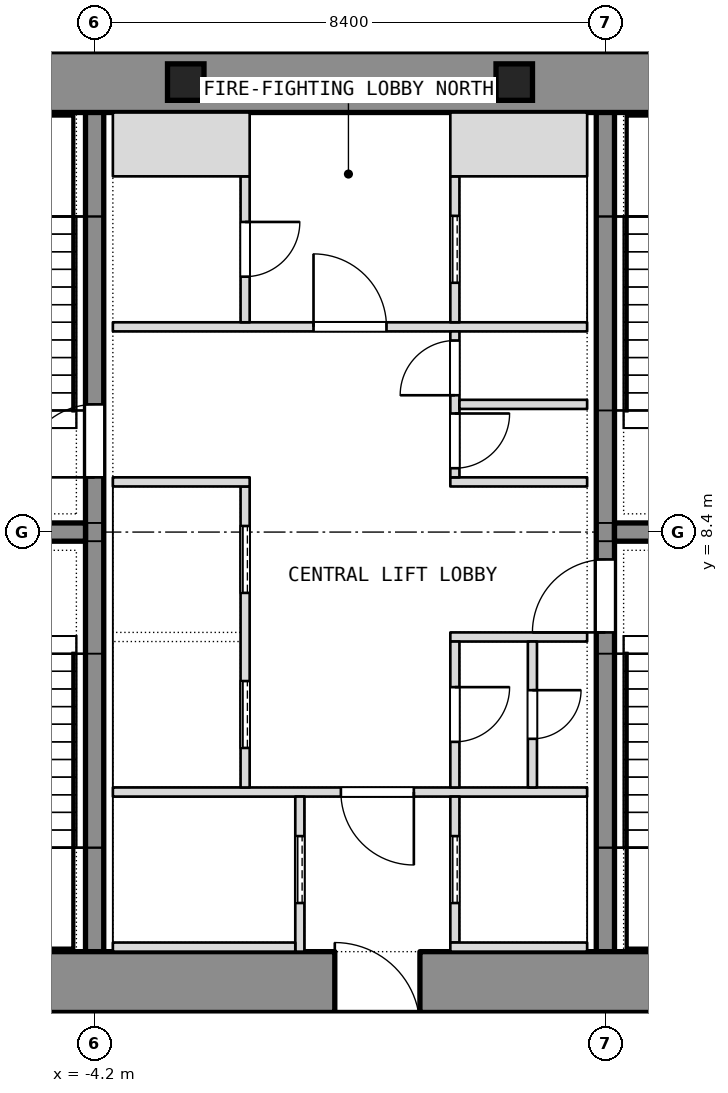
"""IFC4 building model, lengths in metres.
Left out: names, types, materials, properties, quantities, classifications, styles, units other than length and angle.
Written with IfcOpenShell. Run it as: python <this file> out.ifc"""

import sys

from ifc_helpers import new_model, si_unit, direction, frame, frame_2d, origin, origin_2d, place, context, subcontext, project, spatial, rectangle, extrude, element, fill, save


model = new_model("IFC4")
c1 = context("Model", 3, precision=1e-05, world=origin(), true_north=direction((0.0, 1.0)))
c2 = subcontext(c1, "Body", "Model", "MODEL_VIEW")
j1 = project(units=[si_unit("LENGTHUNIT", "METRE"), si_unit("PLANEANGLEUNIT", "RADIAN")], contexts=[c1])
p1 = place(None, origin())
s1 = spatial("IfcSite", under=j1, at=p1, CompositionType="ELEMENT")
p2 = place(p1, origin())
s2 = spatial("IfcBuilding", under=s1, at=p2, CompositionType="ELEMENT")
p3 = place(p2, frame((0.0, 0.0, 281.3)))
s3 = spatial("IfcBuildingStorey", under=s2, at=p3, CompositionType="ELEMENT", Elevation=281.3)
p4 = place(p3, frame((-4.2, 0.5, 0.0), z_axis=(0.0, 0.0, 1.0), x_axis=(0.0, 1.0, 0.0)))
e1 = element("IfcWall", 1, at=p4, inside=s3, PredefinedType="SHEAR", context=c2, shape_type="SweptSolid", body=[
    extrude(rectangle(XDim=15.8, YDim=0.3, at=frame_2d((7.9, 0.0))), origin(), (0.0, 0.0, 1.0), 7.2),
])
p5 = place(p4, frame((8.8, 0.0, 0.0)))
e2 = element("IfcOpeningElement", 2, at=p5, cuts=e1, PredefinedType="OPENING", context=c2, shape_type="SweptSolid", body=[
    extrude(rectangle(XDim=1.2, YDim=2.1, at=frame_2d((0.6, 1.05))), frame((0.0, 0.15, 0.0), z_axis=(0.0, -1.0, 0.0), x_axis=(1.0, 0.0, 0.0)), (0.0, 0.0, 1.0), 0.3),
])
p6 = place(p3, frame((4.2, 0.5, 0.0), z_axis=(0.0, 0.0, 1.0), x_axis=(0.0, 1.0, 0.0)))
e3 = element("IfcWall", 3, at=p6, inside=s3, PredefinedType="SHEAR", context=c2, shape_type="SweptSolid", body=[
    extrude(rectangle(XDim=15.8, YDim=0.3, at=frame_2d((7.9, 0.0))), origin(), (0.0, 0.0, 1.0), 7.2),
])
p7 = place(p6, frame((6.25, 0.0, 0.0)))
e4 = element("IfcOpeningElement", 4, at=p7, cuts=e3, PredefinedType="OPENING", context=c2, shape_type="SweptSolid", body=[
    extrude(rectangle(XDim=1.2, YDim=2.1, at=frame_2d((0.6, 1.05))), frame((0.0, 0.15, 0.0), z_axis=(0.0, -1.0, 0.0), x_axis=(1.0, 0.0, 0.0)), (0.0, 0.0, 1.0), 0.3),
])
for number, where, z_axis, x_axis in (
    (5, (-11.1, 8.4, 0.0), (0.0, 0.0, 1.0), (1.0, 0.0, 0.0)),
    (6, (4.35, 8.4, 0.0), (0.0, 0.0, 1.0), (1.0, 0.0, 0.0)),
):
    element("IfcWall", number, at=place(p3, frame(where, z_axis=z_axis, x_axis=x_axis)), inside=s3, PredefinedType="SHEAR", context=c2, shape_type="SweptSolid", body=[
        extrude(rectangle(XDim=6.75, YDim=0.3, at=frame_2d((3.375, 0.0))), origin(), (0.0, 0.0, 1.0), 7.2),
    ])
for number, where, z_axis, x_axis in (
    (7, (-2.701, 15.8, 0.0), (0.0, 0.0, 1.0), (1.0, 0.0, 0.0)),
    (8, (2.701, 15.8, 0.0), (0.0, 0.0, 1.0), (1.0, 0.0, 0.0)),
):
    element("IfcColumn", number, at=place(p3, frame(where, z_axis=z_axis, x_axis=x_axis)), inside=s3, PredefinedType="COLUMN", context=c2, shape_type="SweptSolid", body=[
        extrude(rectangle(XDim=0.6, YDim=0.6, at=origin_2d()), origin(), (0.0, 0.0, 1.0), 7.2),
    ])
p8 = place(p3, frame((-11.1, 1.0, 0.0), z_axis=(0.0, 0.0, 1.0), x_axis=(1.0, 0.0, 0.0)))
e9 = element("IfcWall", 9, at=p8, inside=s3, PredefinedType="PARTITIONING", context=c2, shape_type="SweptSolid", body=[
    extrude(rectangle(XDim=10.85, YDim=1.0, at=frame_2d((5.425, 0.0))), origin(), (0.0, 0.0, 1.0), 6.94),
])
p9 = place(p3, frame((1.15, 1.0, 0.0), z_axis=(0.0, 0.0, 1.0), x_axis=(1.0, 0.0, 0.0)))
e10 = element("IfcWall", 10, at=p9, inside=s3, PredefinedType="PARTITIONING", context=c2, shape_type="SweptSolid", body=[
    extrude(rectangle(XDim=9.95, YDim=1.0, at=frame_2d((4.975, 0.0))), origin(), (0.0, 0.0, 1.0), 6.94),
])
p10 = place(p3, frame((-11.1, 15.8, 0.0), z_axis=(0.0, 0.0, 1.0), x_axis=(1.0, 0.0, 0.0)))
e11 = element("IfcWall", 11, at=p10, inside=s3, PredefinedType="PARTITIONING", context=c2, shape_type="SweptSolid", body=[
    extrude(rectangle(XDim=22.2, YDim=1.0, at=frame_2d((11.1, 0.0))), origin(), (0.0, 0.0, 1.0), 6.94),
])
p11 = place(p3, frame((-3.9, 4.125, 0.0), z_axis=(0.0, 0.0, 1.0), x_axis=(1.0, 0.0, 0.0)))
e12 = element("IfcWall", 12, at=p11, inside=s3, PredefinedType="PARTITIONING", context=c2, shape_type="SweptSolid", body=[
    extrude(rectangle(XDim=7.8, YDim=0.15, at=frame_2d((3.9, 0.0))), origin(), (0.0, 0.0, 1.0), 6.94),
])
p12 = place(p11, frame((3.75, 0.0, 0.0)))
e13 = element("IfcOpeningElement", 13, at=p12, cuts=e12, PredefinedType="OPENING", context=c2, shape_type="SweptSolid", body=[
    extrude(rectangle(XDim=1.2, YDim=2.1, at=frame_2d((0.6, 1.05))), frame((0.0, 0.075, 0.0), z_axis=(0.0, -1.0, 0.0), x_axis=(1.0, 0.0, 0.0)), (0.0, 0.0, 1.0), 0.15),
])
p13 = place(p3, frame((-3.9, 11.775, 0.0), z_axis=(0.0, 0.0, 1.0), x_axis=(1.0, 0.0, 0.0)))
e14 = element("IfcWall", 14, at=p13, inside=s3, PredefinedType="PARTITIONING", context=c2, shape_type="SweptSolid", body=[
    extrude(rectangle(XDim=7.8, YDim=0.15, at=frame_2d((3.9, 0.0))), origin(), (0.0, 0.0, 1.0), 6.94),
])
p14 = place(p13, frame((3.3, 0.0, 0.0)))
e15 = element("IfcOpeningElement", 15, at=p14, cuts=e14, PredefinedType="OPENING", context=c2, shape_type="SweptSolid", body=[
    extrude(rectangle(XDim=1.2, YDim=2.1, at=frame_2d((0.6, 1.05))), frame((0.0, 0.075, 0.0), z_axis=(0.0, -1.0, 0.0), x_axis=(1.0, 0.0, 0.0)), (0.0, 0.0, 1.0), 0.15),
])
p15 = place(p3, frame((-0.825, 1.5, 0.0), z_axis=(0.0, 0.0, 1.0), x_axis=(0.0, 1.0, 0.0)))
e16 = element("IfcWall", 16, at=p15, inside=s3, PredefinedType="SHEAR", context=c2, shape_type="SweptSolid", body=[
    extrude(rectangle(XDim=2.55, YDim=0.15, at=frame_2d((1.275, 0.0))), origin(), (0.0, 0.0, 1.0), 7.2),
])
p16 = place(p15, frame((0.8, 0.0, 0.0)))
e17 = element("IfcOpeningElement", 17, at=p16, cuts=e16, PredefinedType="OPENING", context=c2, shape_type="SweptSolid", body=[
    extrude(rectangle(XDim=1.1, YDim=2.1, at=frame_2d((0.55, 1.05))), frame((0.0, 0.075, 0.0), z_axis=(0.0, -1.0, 0.0), x_axis=(1.0, 0.0, 0.0)), (0.0, 0.0, 1.0), 0.15),
])
p17 = place(p3, frame((-3.9, 1.575, 0.0), z_axis=(0.0, 0.0, 1.0), x_axis=(1.0, 0.0, 0.0)))
e18 = element("IfcWall", 18, at=p17, inside=s3, PredefinedType="SHEAR", context=c2, shape_type="SweptSolid", body=[
    extrude(rectangle(XDim=3.0, YDim=0.15, at=frame_2d((1.5, 0.0))), origin(), (0.0, 0.0, 1.0), 7.2),
])
p18 = place(p3, frame((-1.725, 4.2, 0.0), z_axis=(0.0, 0.0, 1.0), x_axis=(0.0, 1.0, 0.0)))
e19 = element("IfcWall", 19, at=p18, inside=s3, PredefinedType="SHEAR", context=c2, shape_type="SweptSolid", body=[
    extrude(rectangle(XDim=4.95, YDim=0.15, at=frame_2d((2.475, 0.0))), origin(), (0.0, 0.0, 1.0), 7.2),
])
p19 = place(p18, frame((0.65, 0.0, 0.0)))
e20 = element("IfcOpeningElement", 20, at=p19, cuts=e19, PredefinedType="OPENING", context=c2, shape_type="SweptSolid", body=[
    extrude(rectangle(XDim=1.1, YDim=2.1, at=frame_2d((0.55, 1.05))), frame((0.0, 0.075, 0.0), z_axis=(0.0, -1.0, 0.0), x_axis=(1.0, 0.0, 0.0)), (0.0, 0.0, 1.0), 0.15),
])
p20 = place(p18, frame((3.2, 0.0, 0.0)))
e21 = element("IfcOpeningElement", 21, at=p20, cuts=e19, PredefinedType="OPENING", context=c2, shape_type="SweptSolid", body=[
    extrude(rectangle(XDim=1.1, YDim=2.1, at=frame_2d((0.55, 1.05))), frame((0.0, 0.075, 0.0), z_axis=(0.0, -1.0, 0.0), x_axis=(1.0, 0.0, 0.0)), (0.0, 0.0, 1.0), 0.15),
])
p21 = place(p3, frame((-3.9, 9.225, 0.0), z_axis=(0.0, 0.0, 1.0), x_axis=(1.0, 0.0, 0.0)))
e22 = element("IfcWall", 22, at=p21, inside=s3, PredefinedType="SHEAR", context=c2, shape_type="SweptSolid", body=[
    extrude(rectangle(XDim=2.25, YDim=0.15, at=frame_2d((1.125, 0.0))), origin(), (0.0, 0.0, 1.0), 7.2),
])
p22 = place(p3, frame((-1.725, 11.85, 0.0), z_axis=(0.0, 0.0, 1.0), x_axis=(0.0, 1.0, 0.0)))
e23 = element("IfcWall", 23, at=p22, inside=s3, PredefinedType="PARTITIONING", context=c2, shape_type="SweptSolid", body=[
    extrude(rectangle(XDim=2.4, YDim=0.15, at=frame_2d((1.2, 0.0))), origin(), (0.0, 0.0, 1.0), 6.94),
])
p23 = place(p22, frame((0.75, 0.0, 0.0)))
e24 = element("IfcOpeningElement", 24, at=p23, cuts=e23, PredefinedType="OPENING", context=c2, shape_type="SweptSolid", body=[
    extrude(rectangle(XDim=0.9, YDim=2.1, at=frame_2d((0.45, 1.05))), frame((0.0, 0.075, 0.0), z_axis=(0.0, -1.0, 0.0), x_axis=(1.0, 0.0, 0.0)), (0.0, 0.0, 1.0), 0.15),
])
p24 = place(p3, frame((-3.9, 14.775, 0.0), z_axis=(0.0, 0.0, 1.0), x_axis=(1.0, 0.0, 0.0)))
e25 = element("IfcWall", 25, at=p24, inside=s3, PredefinedType="PARTITIONING", context=c2, shape_type="SweptSolid", body=[
    extrude(rectangle(XDim=2.25, YDim=1.05, at=frame_2d((1.125, 0.0))), origin(), (0.0, 0.0, 1.0), 6.94),
])
p25 = place(p3, frame((1.725, 1.65, 0.0), z_axis=(0.0, 0.0, 1.0), x_axis=(0.0, 1.0, 0.0)))
e26 = element("IfcWall", 26, at=p25, inside=s3, PredefinedType="SHEAR", context=c2, shape_type="SweptSolid", body=[
    extrude(rectangle(XDim=2.4, YDim=0.15, at=frame_2d((1.2, 0.0))), origin(), (0.0, 0.0, 1.0), 7.2),
])
p26 = place(p25, frame((0.65, 0.0, 0.0)))
e27 = element("IfcOpeningElement", 27, at=p26, cuts=e26, PredefinedType="OPENING", context=c2, shape_type="SweptSolid", body=[
    extrude(rectangle(XDim=1.1, YDim=2.1, at=frame_2d((0.55, 1.05))), frame((0.0, 0.075, 0.0), z_axis=(0.0, -1.0, 0.0), x_axis=(1.0, 0.0, 0.0)), (0.0, 0.0, 1.0), 0.15),
])
p27 = place(p3, frame((1.65, 1.575, 0.0), z_axis=(0.0, 0.0, 1.0), x_axis=(1.0, 0.0, 0.0)))
e28 = element("IfcWall", 28, at=p27, inside=s3, PredefinedType="SHEAR", context=c2, shape_type="SweptSolid", body=[
    extrude(rectangle(XDim=2.25, YDim=0.15, at=frame_2d((1.125, 0.0))), origin(), (0.0, 0.0, 1.0), 7.2),
])
p28 = place(p3, frame((1.725, 11.85, 0.0), z_axis=(0.0, 0.0, 1.0), x_axis=(0.0, 1.0, 0.0)))
e29 = element("IfcWall", 29, at=p28, inside=s3, PredefinedType="SHEAR", context=c2, shape_type="SweptSolid", body=[
    extrude(rectangle(XDim=2.4, YDim=0.15, at=frame_2d((1.2, 0.0))), origin(), (0.0, 0.0, 1.0), 7.2),
])
p29 = place(p28, frame((0.65, 0.0, 0.0)))
e30 = element("IfcOpeningElement", 30, at=p29, cuts=e29, PredefinedType="OPENING", context=c2, shape_type="SweptSolid", body=[
    extrude(rectangle(XDim=1.1, YDim=2.1, at=frame_2d((0.55, 1.05))), frame((0.0, 0.075, 0.0), z_axis=(0.0, -1.0, 0.0), x_axis=(1.0, 0.0, 0.0)), (0.0, 0.0, 1.0), 0.15),
])
p30 = place(p3, frame((1.65, 14.775, 0.0), z_axis=(0.0, 0.0, 1.0), x_axis=(1.0, 0.0, 0.0)))
e31 = element("IfcWall", 31, at=p30, inside=s3, PredefinedType="SHEAR", context=c2, shape_type="SweptSolid", body=[
    extrude(rectangle(XDim=2.25, YDim=1.05, at=frame_2d((1.125, 0.0))), origin(), (0.0, 0.0, 1.0), 7.2),
])
for number, where, z_axis, x_axis in (
    (32, (1.65, 6.675, 0.0), (0.0, 0.0, 1.0), (1.0, 0.0, 0.0)),
    (33, (1.65, 9.225, 0.0), (0.0, 0.0, 1.0), (1.0, 0.0, 0.0)),
):
    element("IfcWall", number, at=place(p3, frame(where, z_axis=z_axis, x_axis=x_axis)), inside=s3, PredefinedType="PARTITIONING", context=c2, shape_type="SweptSolid", body=[
        extrude(rectangle(XDim=2.25, YDim=0.15, at=frame_2d((1.125, 0.0))), origin(), (0.0, 0.0, 1.0), 6.94),
    ])
p31 = place(p3, frame((1.725, 4.2, 0.0), z_axis=(0.0, 0.0, 1.0), x_axis=(0.0, 1.0, 0.0)))
e34 = element("IfcWall", 34, at=p31, inside=s3, PredefinedType="PARTITIONING", context=c2, shape_type="SweptSolid", body=[
    extrude(rectangle(XDim=2.4, YDim=0.15, at=frame_2d((1.2, 0.0))), origin(), (0.0, 0.0, 1.0), 6.94),
])
p32 = place(p31, frame((0.75, 0.0, 0.0)))
e35 = element("IfcOpeningElement", 35, at=p32, cuts=e34, PredefinedType="OPENING", context=c2, shape_type="SweptSolid", body=[
    extrude(rectangle(XDim=0.9, YDim=2.1, at=frame_2d((0.45, 1.05))), frame((0.0, 0.075, 0.0), z_axis=(0.0, -1.0, 0.0), x_axis=(1.0, 0.0, 0.0)), (0.0, 0.0, 1.0), 0.15),
])
p33 = place(p3, frame((1.725, 9.3, 0.0), z_axis=(0.0, 0.0, 1.0), x_axis=(0.0, 1.0, 0.0)))
e36 = element("IfcWall", 36, at=p33, inside=s3, PredefinedType="PARTITIONING", context=c2, shape_type="SweptSolid", body=[
    extrude(rectangle(XDim=2.4, YDim=0.15, at=frame_2d((1.2, 0.0))), origin(), (0.0, 0.0, 1.0), 6.94),
])
p34 = place(p33, frame((0.15, 0.0, 0.0)))
e37 = element("IfcOpeningElement", 37, at=p34, cuts=e36, PredefinedType="OPENING", context=c2, shape_type="SweptSolid", body=[
    extrude(rectangle(XDim=0.9, YDim=2.1, at=frame_2d((0.45, 1.05))), frame((0.0, 0.075, 0.0), z_axis=(0.0, -1.0, 0.0), x_axis=(1.0, 0.0, 0.0)), (0.0, 0.0, 1.0), 0.15),
])
p35 = place(p33, frame((1.35, 0.0, 0.0)))
e38 = element("IfcOpeningElement", 38, at=p35, cuts=e36, PredefinedType="OPENING", context=c2, shape_type="SweptSolid", body=[
    extrude(rectangle(XDim=0.9, YDim=2.1, at=frame_2d((0.45, 1.05))), frame((0.0, 0.075, 0.0), z_axis=(0.0, -1.0, 0.0), x_axis=(1.0, 0.0, 0.0)), (0.0, 0.0, 1.0), 0.15),
])
p36 = place(p3, frame((3.0, 4.2, 0.0), z_axis=(0.0, 0.0, 1.0), x_axis=(0.0, 1.0, 0.0)))
e39 = element("IfcWall", 39, at=p36, inside=s3, PredefinedType="PARTITIONING", context=c2, shape_type="SweptSolid", body=[
    extrude(rectangle(XDim=2.4, YDim=0.15, at=frame_2d((1.2, 0.0))), origin(), (0.0, 0.0, 1.0), 6.94),
])
p37 = place(p36, frame((0.8, 0.0, 0.0)))
e40 = element("IfcOpeningElement", 40, at=p37, cuts=e39, PredefinedType="OPENING", context=c2, shape_type="SweptSolid", body=[
    extrude(rectangle(XDim=0.8, YDim=2.1, at=frame_2d((0.4, 1.05))), frame((0.0, 0.075, 0.0), z_axis=(0.0, -1.0, 0.0), x_axis=(1.0, 0.0, 0.0)), (0.0, 0.0, 1.0), 0.15),
])
p38 = place(p3, frame((1.8, 10.5, 0.0), z_axis=(0.0, 0.0, 1.0), x_axis=(1.0, 0.0, 0.0)))
e41 = element("IfcWall", 41, at=p38, inside=s3, PredefinedType="PARTITIONING", context=c2, shape_type="SweptSolid", body=[
    extrude(rectangle(XDim=2.1, YDim=0.15, at=frame_2d((1.05, 0.0))), origin(), (0.0, 0.0, 1.0), 6.94),
])
p39 = place(p32, origin())
e42 = element("IfcDoor", 42, at=p39, inside=s3, OperationType="SINGLE_SWING_LEFT", PredefinedType="DOOR", context=c2, shape_type="SweptSolid", body=[
    extrude(rectangle(XDim=0.9, YDim=2.1, at=frame_2d((0.45, 1.05))), frame((0.0, 0.025, 0.0), z_axis=(0.0, -1.0, 0.0), x_axis=(1.0, 0.0, 0.0)), (0.0, 0.0, 1.0), 0.05),
])
fill(e35, e42)
p40 = place(p37, origin())
e43 = element("IfcDoor", 43, at=p40, inside=s3, OperationType="SINGLE_SWING_LEFT", PredefinedType="DOOR", context=c2, shape_type="SweptSolid", body=[
    extrude(rectangle(XDim=0.8, YDim=2.1, at=frame_2d((0.4, 1.05))), frame((0.0, 0.025, 0.0), z_axis=(0.0, -1.0, 0.0), x_axis=(1.0, 0.0, 0.0)), (0.0, 0.0, 1.0), 0.05),
])
fill(e40, e43)
p41 = place(p34, origin())
e44 = element("IfcDoor", 44, at=p41, inside=s3, OperationType="SINGLE_SWING_LEFT", PredefinedType="DOOR", context=c2, shape_type="SweptSolid", body=[
    extrude(rectangle(XDim=0.9, YDim=2.1, at=frame_2d((0.45, 1.05))), frame((0.0, 0.025, 0.0), z_axis=(0.0, -1.0, 0.0), x_axis=(1.0, 0.0, 0.0)), (0.0, 0.0, 1.0), 0.05),
])
fill(e37, e44)
p42 = place(p35, origin())
e45 = element("IfcDoor", 45, at=p42, inside=s3, OperationType="SINGLE_SWING_LEFT", PredefinedType="DOOR", context=c2, shape_type="SweptSolid", body=[
    extrude(rectangle(XDim=0.9, YDim=2.1, at=frame_2d((0.45, 1.05))), frame((0.0, 0.025, 0.0), z_axis=(0.0, -1.0, 0.0), x_axis=(1.0, 0.0, 0.0)), (0.0, 0.0, 1.0), 0.05),
])
fill(e38, e45)
p43 = place(p16, origin())
e46 = element("IfcDoor", 46, at=p43, inside=s3, OperationType="SLIDING_TO_LEFT", PredefinedType="DOOR", context=c2, shape_type="SweptSolid", body=[
    extrude(rectangle(XDim=1.1, YDim=2.1, at=frame_2d((0.55, 1.05))), frame((0.0, 0.025, 0.0), z_axis=(0.0, -1.0, 0.0), x_axis=(1.0, 0.0, 0.0)), (0.0, 0.0, 1.0), 0.05),
])
fill(e17, e46)
p44 = place(p19, origin())
e47 = element("IfcDoor", 47, at=p44, inside=s3, OperationType="SLIDING_TO_LEFT", PredefinedType="DOOR", context=c2, shape_type="SweptSolid", body=[
    extrude(rectangle(XDim=1.1, YDim=2.1, at=frame_2d((0.55, 1.05))), frame((0.0, 0.025, 0.0), z_axis=(0.0, -1.0, 0.0), x_axis=(1.0, 0.0, 0.0)), (0.0, 0.0, 1.0), 0.05),
])
fill(e20, e47)
p45 = place(p20, origin())
e48 = element("IfcDoor", 48, at=p45, inside=s3, OperationType="SLIDING_TO_LEFT", PredefinedType="DOOR", context=c2, shape_type="SweptSolid", body=[
    extrude(rectangle(XDim=1.1, YDim=2.1, at=frame_2d((0.55, 1.05))), frame((0.0, 0.025, 0.0), z_axis=(0.0, -1.0, 0.0), x_axis=(1.0, 0.0, 0.0)), (0.0, 0.0, 1.0), 0.05),
])
fill(e21, e48)
p46 = place(p26, origin())
e49 = element("IfcDoor", 49, at=p46, inside=s3, OperationType="SLIDING_TO_LEFT", PredefinedType="DOOR", context=c2, shape_type="SweptSolid", body=[
    extrude(rectangle(XDim=1.1, YDim=2.1, at=frame_2d((0.55, 1.05))), frame((0.0, 0.025, 0.0), z_axis=(0.0, -1.0, 0.0), x_axis=(1.0, 0.0, 0.0)), (0.0, 0.0, 1.0), 0.05),
])
fill(e27, e49)
p47 = place(p29, origin())
e50 = element("IfcDoor", 50, at=p47, inside=s3, OperationType="SLIDING_TO_LEFT", PredefinedType="DOOR", context=c2, shape_type="SweptSolid", body=[
    extrude(rectangle(XDim=1.1, YDim=2.1, at=frame_2d((0.55, 1.05))), frame((0.0, 0.025, 0.0), z_axis=(0.0, -1.0, 0.0), x_axis=(1.0, 0.0, 0.0)), (0.0, 0.0, 1.0), 0.05),
])
fill(e30, e50)
p48 = place(p12, origin())
e51 = element("IfcDoor", 51, at=p48, inside=s3, OperationType="SINGLE_SWING_LEFT", PredefinedType="DOOR", context=c2, shape_type="SweptSolid", body=[
    extrude(rectangle(XDim=1.2, YDim=2.1, at=frame_2d((0.6, 1.05))), frame((0.0, 0.025, 0.0), z_axis=(0.0, -1.0, 0.0), x_axis=(1.0, 0.0, 0.0)), (0.0, 0.0, 1.0), 0.05),
])
fill(e13, e51)
p49 = place(p14, origin())
e52 = element("IfcDoor", 52, at=p49, inside=s3, OperationType="SINGLE_SWING_LEFT", PredefinedType="DOOR", context=c2, shape_type="SweptSolid", body=[
    extrude(rectangle(XDim=1.2, YDim=2.1, at=frame_2d((0.6, 1.05))), frame((0.0, 0.025, 0.0), z_axis=(0.0, -1.0, 0.0), x_axis=(1.0, 0.0, 0.0)), (0.0, 0.0, 1.0), 0.05),
])
fill(e15, e52)
p50 = place(p23, origin())
e53 = element("IfcDoor", 53, at=p50, inside=s3, OperationType="SINGLE_SWING_LEFT", PredefinedType="DOOR", context=c2, shape_type="SweptSolid", body=[
    extrude(rectangle(XDim=0.9, YDim=2.1, at=frame_2d((0.45, 1.05))), frame((0.0, 0.025, 0.0), z_axis=(0.0, -1.0, 0.0), x_axis=(1.0, 0.0, 0.0)), (0.0, 0.0, 1.0), 0.05),
])
fill(e24, e53)
p51 = place(p5, origin())
e54 = element("IfcDoor", 54, at=p51, inside=s3, OperationType="SINGLE_SWING_LEFT", PredefinedType="DOOR", context=c2, shape_type="SweptSolid", body=[
    extrude(rectangle(XDim=1.2, YDim=2.1, at=frame_2d((0.6, 1.05))), frame((0.0, 0.025, 0.0), z_axis=(0.0, -1.0, 0.0), x_axis=(1.0, 0.0, 0.0)), (0.0, 0.0, 1.0), 0.05),
])
fill(e2, e54)
p52 = place(p7, origin())
e55 = element("IfcDoor", 55, at=p52, inside=s3, OperationType="SINGLE_SWING_LEFT", PredefinedType="DOOR", context=c2, shape_type="SweptSolid", body=[
    extrude(rectangle(XDim=1.2, YDim=2.1, at=frame_2d((0.6, 1.05))), frame((0.0, 0.025, 0.0), z_axis=(0.0, -1.0, 0.0), x_axis=(1.0, 0.0, 0.0)), (0.0, 0.0, 1.0), 0.05),
])
fill(e4, e55)
save(model, sys.argv[1])
